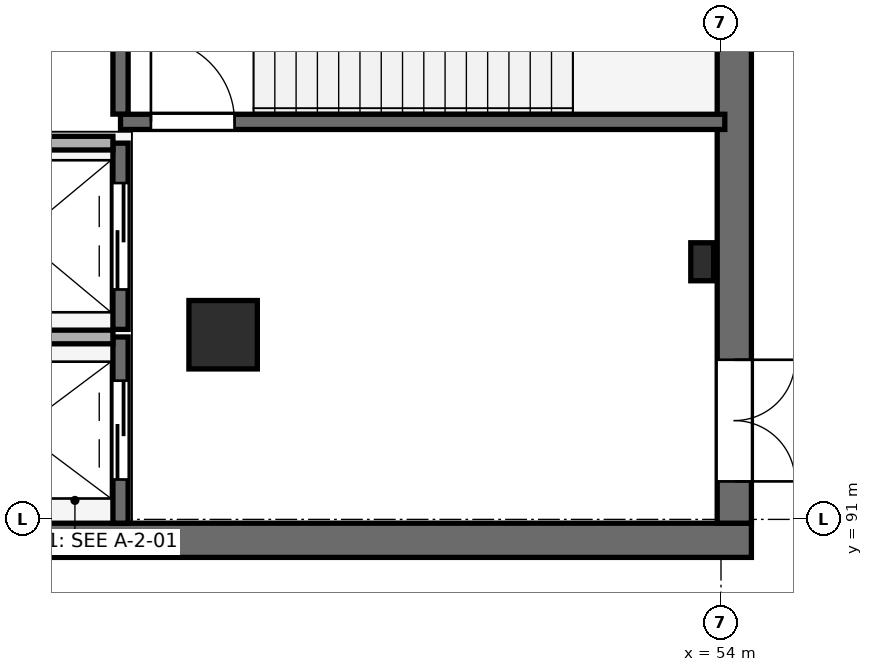
"""IFC4 building model, lengths in metres.
Left out: names, types, materials, properties, quantities, classifications, styles, units other than length and angle.
Written with IfcOpenShell. Run it as: python <this file> out.ifc"""

import sys

from ifc_helpers import new_model, si_unit, direction, frame, frame_2d, origin, origin_2d, place, context, subcontext, project, spatial, rectangle, i_section, extrude, element, fill, save


model = new_model("IFC4")
c1 = context("Model", 3, precision=1e-05, world=origin(), true_north=direction((0.0, 1.0)))
c2 = subcontext(c1, "Body", "Model", "MODEL_VIEW")
j1 = project(units=[si_unit("LENGTHUNIT", "METRE"), si_unit("PLANEANGLEUNIT", "RADIAN")], contexts=[c1])
p1 = place(None, origin())
s1 = spatial("IfcSite", under=j1, at=p1, CompositionType="ELEMENT")
p2 = place(p1, origin())
s2 = spatial("IfcBuilding", under=s1, at=p2, CompositionType="ELEMENT")
p3 = place(p2, frame((0.0, 0.0, -5.4)))
s3 = spatial("IfcBuildingStorey", under=s2, at=p3, CompositionType="ELEMENT", Elevation=-5.4)
p4 = place(p3, frame((47.45, 93.43, 0.0), z_axis=(0.0, 0.0, 1.0), x_axis=(1.0, 0.0, 0.0)))
e1 = element("IfcColumn", 1, at=p4, inside=s3, PredefinedType="COLUMN", context=c2, shape_type="SweptSolid", body=[
    extrude(rectangle(XDim=0.9, YDim=0.9, at=origin_2d()), origin(), (0.0, 0.0, 1.0), 5.4),
])
p5 = place(p3, frame((43.0, 90.725, 0.0), z_axis=(0.0, 0.0, 1.0), x_axis=(1.0, 0.0, 0.0)))
e2 = element("IfcWall", 2, at=p5, inside=s3, PredefinedType="SHEAR", context=c2, shape_type="SweptSolid", body=[
    extrude(rectangle(XDim=11.4, YDim=0.45, at=frame_2d((5.7, 0.0))), origin(), (0.0, 0.0, 1.0), 5.4),
])
p6 = place(p3, frame((54.175, 90.95, 0.0), z_axis=(0.0, 0.0, 1.0), x_axis=(0.0, 1.0, 0.0)))
e3 = element("IfcWall", 3, at=p6, inside=s3, PredefinedType="SHEAR", context=c2, shape_type="SweptSolid", body=[
    extrude(rectangle(XDim=9.1, YDim=0.45, at=frame_2d((4.55, 0.0))), origin(), (0.0, 0.0, 1.0), 5.4),
])
p7 = place(p6, frame((0.55, 0.0, 0.0)))
e4 = element("IfcOpeningElement", 4, at=p7, cuts=e3, PredefinedType="OPENING", context=c2, shape_type="SweptSolid", body=[
    extrude(rectangle(XDim=1.6, YDim=2.2, at=frame_2d((0.8, 1.1))), frame((0.0, 0.235, 0.0), z_axis=(0.0, -1.0, 0.0), x_axis=(1.0, 0.0, 0.0)), (0.0, 0.0, 1.0), 0.47),
])
p8 = place(p3, frame((53.752, 94.389, 0.0), z_axis=(0.0, 0.0, 1.0), x_axis=(1.0, 0.0, 0.0)))
e5 = element("IfcColumn", 5, at=p8, inside=s3, PredefinedType="COLUMN", context=c2, shape_type="SweptSolid", body=[
    extrude(i_section(OverallWidth=0.3, OverallDepth=0.5, WebThickness=0.014, FlangeThickness=0.028, FilletRadius=0.027, at=origin_2d()), origin(), (0.0, 0.0, 1.0), 5.4),
])
p9 = place(p3, frame((46.1, 90.95, 0.0), z_axis=(0.0, 0.0, 1.0), x_axis=(0.0, 1.0, 0.0)))
e6 = element("IfcWall", 6, at=p9, inside=s3, PredefinedType="SHEAR", context=c2, shape_type="SweptSolid", body=[
    extrude(rectangle(XDim=2.45, YDim=0.2, at=frame_2d((1.225, 0.0))), origin(), (0.0, 0.0, 1.0), 5.04),
])
p10 = place(p9, frame((0.575, 0.0, 0.0)))
e7 = element("IfcOpeningElement", 7, at=p10, cuts=e6, PredefinedType="OPENING", context=c2, shape_type="SweptSolid", body=[
    extrude(rectangle(XDim=1.3, YDim=2.2, at=frame_2d((0.65, 1.1))), frame((0.0, 0.11, 0.0), z_axis=(0.0, -1.0, 0.0), x_axis=(1.0, 0.0, 0.0)), (0.0, 0.0, 1.0), 0.22),
])
p11 = place(p3, frame((43.55, 93.4, 0.0), z_axis=(0.0, 0.0, 1.0), x_axis=(1.0, 0.0, 0.0)))
e8 = element("IfcWall", 8, at=p11, inside=s3, PredefinedType="PARTITIONING", context=c2, shape_type="SweptSolid", body=[
    extrude(rectangle(XDim=2.45, YDim=0.18, at=frame_2d((1.225, 0.0))), origin(), (0.0, 0.0, 1.0), 5.4),
])
p12 = place(p3, frame((46.1, 93.5, 0.0), z_axis=(0.0, 0.0, 1.0), x_axis=(0.0, 1.0, 0.0)))
e9 = element("IfcWall", 9, at=p12, inside=s3, PredefinedType="SHEAR", context=c2, shape_type="SweptSolid", body=[
    extrude(rectangle(XDim=2.45, YDim=0.2, at=frame_2d((1.225, 0.0))), origin(), (0.0, 0.0, 1.0), 5.04),
])
p13 = place(p12, frame((0.525, 0.0, 0.0)))
e10 = element("IfcOpeningElement", 10, at=p13, cuts=e9, PredefinedType="OPENING", context=c2, shape_type="SweptSolid", body=[
    extrude(rectangle(XDim=1.4, YDim=2.2, at=frame_2d((0.7, 1.1))), frame((0.0, 0.11, 0.0), z_axis=(0.0, -1.0, 0.0), x_axis=(1.0, 0.0, 0.0)), (0.0, 0.0, 1.0), 0.22),
])
p14 = place(p3, frame((43.55, 95.95, 0.0), z_axis=(0.0, 0.0, 1.0), x_axis=(1.0, 0.0, 0.0)))
e11 = element("IfcWall", 11, at=p14, inside=s3, PredefinedType="PARTITIONING", context=c2, shape_type="SweptSolid", body=[
    extrude(rectangle(XDim=2.45, YDim=0.18, at=frame_2d((1.225, 0.0))), origin(), (0.0, 0.0, 1.0), 5.4),
])
p15 = place(p3, frame((46.1, 96.23, 0.0), z_axis=(0.0, 0.0, 1.0), x_axis=(1.0, 0.0, 0.0)))
e12 = element("IfcWall", 12, at=p15, inside=s3, PredefinedType="SHEAR", context=c2, shape_type="SweptSolid", body=[
    extrude(rectangle(XDim=7.95, YDim=0.2, at=frame_2d((3.975, 0.0))), origin(), (0.0, 0.0, 1.0), 5.4),
])
p16 = place(p15, frame((0.4, 0.0, 0.0)))
e13 = element("IfcOpeningElement", 13, at=p16, cuts=e12, PredefinedType="OPENING", context=c2, shape_type="SweptSolid", body=[
    extrude(rectangle(XDim=1.1, YDim=2.15, at=frame_2d((0.55, 1.075))), frame((0.0, 0.11, 0.0), z_axis=(0.0, -1.0, 0.0), x_axis=(1.0, 0.0, 0.0)), (0.0, 0.0, 1.0), 0.22),
])
p17 = place(p3, frame((46.1, 96.332, 0.0), z_axis=(0.0, 0.0, 1.0), x_axis=(0.0, 1.0, 0.0)))
e14 = element("IfcWall", 14, at=p17, inside=s3, PredefinedType="SHEAR", context=c2, shape_type="SweptSolid", body=[
    extrude(rectangle(XDim=3.686, YDim=0.2, at=frame_2d((1.843, 0.0))), origin(), (0.0, 0.0, 1.0), 5.4),
])
p18 = place(p10, origin())
e15 = element("IfcDoor", 15, at=p18, inside=s3, OperationType="DOUBLE_DOOR_SLIDING", PredefinedType="DOOR", context=c2, shape_type="SweptSolid", body=[
    extrude(rectangle(XDim=1.3, YDim=2.2, at=frame_2d((0.65, 1.1))), frame((0.0, 0.025, 0.0), z_axis=(0.0, -1.0, 0.0), x_axis=(1.0, 0.0, 0.0)), (0.0, 0.0, 1.0), 0.05),
])
fill(e7, e15)
p19 = place(p13, origin())
e16 = element("IfcDoor", 16, at=p19, inside=s3, OperationType="DOUBLE_DOOR_SLIDING", PredefinedType="DOOR", context=c2, shape_type="SweptSolid", body=[
    extrude(rectangle(XDim=1.4, YDim=2.2, at=frame_2d((0.7, 1.1))), frame((0.0, 0.025, 0.0), z_axis=(0.0, -1.0, 0.0), x_axis=(1.0, 0.0, 0.0)), (0.0, 0.0, 1.0), 0.05),
])
fill(e10, e16)
p20 = place(p16, frame((1.1, 0.0, 0.0), z_axis=(0.0, 0.0, 1.0), x_axis=(-1.0, 0.0, 0.0)))
e17 = element("IfcDoor", 17, at=p20, inside=s3, OperationType="SINGLE_SWING_RIGHT", PredefinedType="DOOR", context=c2, shape_type="SweptSolid", body=[
    extrude(rectangle(XDim=1.1, YDim=2.15, at=frame_2d((0.55, 1.075))), frame((0.0, 0.025, 0.0), z_axis=(0.0, -1.0, 0.0), x_axis=(1.0, 0.0, 0.0)), (0.0, 0.0, 1.0), 0.05),
])
fill(e13, e17)
p21 = place(p7, frame((1.6, 0.0, 0.0), z_axis=(0.0, 0.0, 1.0), x_axis=(-1.0, 0.0, 0.0)))
e18 = element("IfcDoor", 18, at=p21, inside=s3, OperationType="DOUBLE_DOOR_SINGLE_SWING", PredefinedType="DOOR", context=c2, shape_type="SweptSolid", body=[
    extrude(rectangle(XDim=1.6, YDim=2.2, at=frame_2d((0.8, 1.1))), frame((0.0, 0.025, 0.0), z_axis=(0.0, -1.0, 0.0), x_axis=(1.0, 0.0, 0.0)), (0.0, 0.0, 1.0), 0.05),
])
fill(e4, e18)
save(model, sys.argv[1])
